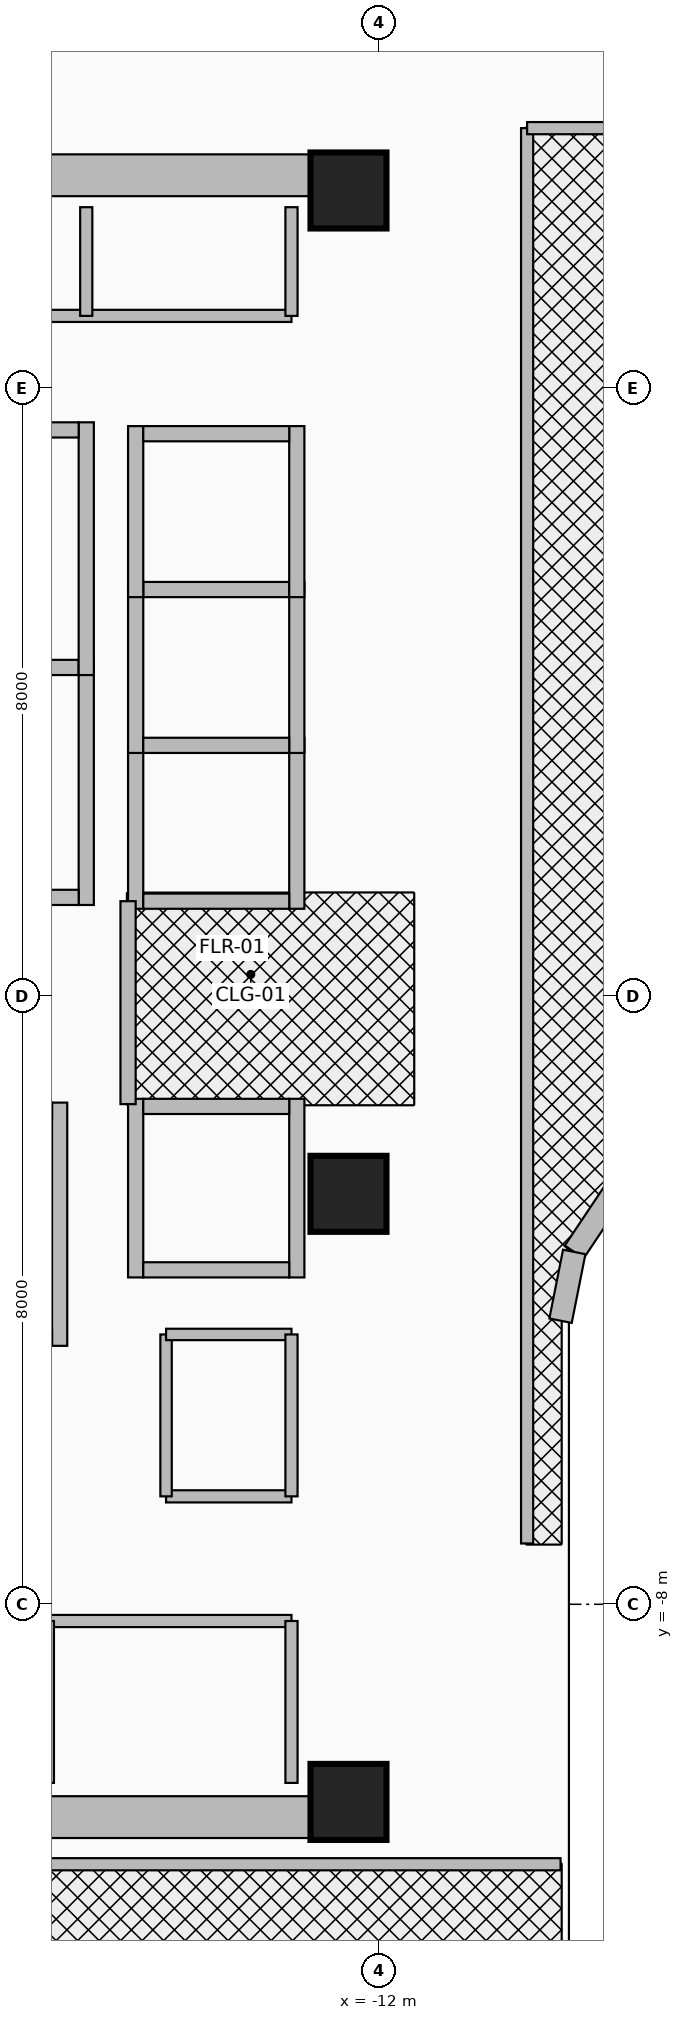
"""IFC4 building model, lengths in metres.
Left out: names, types, materials, properties, quantities, classifications, styles, units other than length and angle.
Written with IfcOpenShell. Run it as: python <this file> out.ifc"""

import sys

from ifc_helpers import new_model, si_unit, direction, frame, frame_2d, origin, origin_2d, place, context, subcontext, project, spatial, rectangle, extrude, source, transform, mapped, element, fill, save


model = new_model("IFC4")
c1 = context("Model", 3, precision=1e-05, world=origin(), true_north=direction((0.0, 1.0)))
c2 = subcontext(c1, "Body", "Model", "MODEL_VIEW")
j1 = project(units=[si_unit("LENGTHUNIT", "METRE"), si_unit("PLANEANGLEUNIT", "RADIAN")], contexts=[c1])
p1 = place(None, origin())
s1 = spatial("IfcSite", under=j1, at=p1, CompositionType="ELEMENT")
p2 = place(p1, origin())
s2 = spatial("IfcBuilding", under=s1, at=p2, CompositionType="ELEMENT")
p3 = place(p2, frame((0.0, 0.0, 180.5)))
s3 = spatial("IfcBuildingStorey", under=s2, at=p3, CompositionType="ELEMENT", Elevation=180.5)
for number, where, z_axis, x_axis in (
    (1, (-22.65, 10.8, 0.0), (0.0, 0.0, 1.0), (1.0, 0.0, 0.0)),
    (2, (-22.65, -10.8, 0.0), (0.0, 0.0, 1.0), (1.0, 0.0, 0.0)),
):
    element("IfcWall", number, at=place(p3, frame(where, z_axis=z_axis, x_axis=x_axis)), inside=s3, PredefinedType="SHEAR", context=c2, shape_type="SweptSolid", body=[
        extrude(rectangle(XDim=10.25, YDim=0.55, at=frame_2d((5.125, 0.0))), origin(), (0.0, 0.0, 1.0), 3.63),
    ])
m1 = source(origin(), c2, "Body", "SweptSolid", [
    extrude(rectangle(XDim=1.0, YDim=1.0, at=origin_2d()), origin(), (0.0, 0.0, 1.0), 3.95),
])
for number, where, z_axis, x_axis in (
    (3, (-12.4, -10.6, 0.0), (0.0, 0.0, 1.0), (1.0, 0.0, 0.0)),
    (4, (-12.4, -2.6, 0.0), (0.0, 0.0, 1.0), (1.0, 0.0, 0.0)),
    (5, (-12.4, 10.6, 0.0), (0.0, 0.0, 1.0), (1.0, 0.0, 0.0)),
):
    element("IfcColumn", number, at=place(p3, frame(where, z_axis=z_axis, x_axis=x_axis)), inside=s3, PredefinedType="COLUMN", context=c2, shape_type="MappedRepresentation", body=[
        mapped(m1, transform((0.0, 0.0, 0.0), x_axis=(1.0, 0.0, 0.0), y_axis=(0.0, 1.0, 0.0), z_axis=(0.0, 0.0, 1.0), scale=1.0)),
    ])
p4 = place(p3, frame((-8.912, -2.588, 0.0), z_axis=(0.0, 0.0, 1.0), x_axis=(-0.555364065883, -0.831607331814, 0.0)))
e6 = element("IfcWall", 6, at=p4, inside=s3, PredefinedType="SOLIDWALL", context=c2, shape_type="SweptSolid", body=[
    extrude(rectangle(XDim=0.933, YDim=0.3, at=frame_2d((0.467, 0.0))), origin(), (0.0, 0.0, 1.0), 3.63),
])
p5 = place(p3, frame((-9.43, -3.365, 0.0), z_axis=(0.0, 0.0, 1.0), x_axis=(-0.195301801101, -0.980743190895, 0.0)))
e7 = element("IfcWall", 7, at=p5, inside=s3, PredefinedType="SOLIDWALL", context=c2, shape_type="SweptSolid", body=[
    extrude(rectangle(XDim=0.923, YDim=0.3, at=frame_2d((0.461, 0.0))), origin(), (0.0, 0.0, 1.0), 3.63),
])
p6 = place(p3, frame((-15.85, 1.2, 0.0), z_axis=(0.0, 0.0, 1.0), x_axis=(0.0, 1.0, 0.0)))
e8 = element("IfcWall", 8, at=p6, inside=s3, PredefinedType="MOVABLE", context=c2, shape_type="SweptSolid", body=[
    extrude(rectangle(XDim=3.225, YDim=0.2, at=frame_2d((1.613, 0.0))), origin(), (0.0, 0.0, 1.0), 3.63),
])
p7 = place(p3, frame((-18.55, 1.3, 0.0), z_axis=(0.0, 0.0, 1.0), x_axis=(1.0, 0.0, 0.0)))
e9 = element("IfcWall", 9, at=p7, inside=s3, PredefinedType="MOVABLE", context=c2, shape_type="SweptSolid", body=[
    extrude(rectangle(XDim=2.6, YDim=0.2, at=frame_2d((1.3, 0.0))), origin(), (0.0, 0.0, 1.0), 3.63),
])
p8 = place(p7, frame((0.7, 0.0, 0.0)))
e10 = element("IfcOpeningElement", 10, at=p8, cuts=e9, PredefinedType="OPENING", context=c2, shape_type="SweptSolid", body=[
    extrude(rectangle(XDim=1.2, YDim=2.1, at=frame_2d((0.6, 1.05))), frame((0.0, 0.115, 0.0), z_axis=(0.0, -1.0, 0.0), x_axis=(1.0, 0.0, 0.0)), (0.0, 0.0, 1.0), 0.23),
])
p9 = place(p3, frame((-18.55, 4.325, 0.0), z_axis=(0.0, 0.0, 1.0), x_axis=(1.0, 0.0, 0.0)))
e11 = element("IfcWall", 11, at=p9, inside=s3, PredefinedType="MOVABLE", context=c2, shape_type="SweptSolid", body=[
    extrude(rectangle(XDim=2.6, YDim=0.2, at=frame_2d((1.3, 0.0))), origin(), (0.0, 0.0, 1.0), 3.63),
])
p10 = place(p3, frame((-16.2, -4.6, 0.0), z_axis=(0.0, 0.0, 1.0), x_axis=(0.0, 1.0, 0.0)))
e12 = element("IfcWall", 12, at=p10, inside=s3, PredefinedType="MOVABLE", context=c2, shape_type="SweptSolid", body=[
    extrude(rectangle(XDim=3.2, YDim=0.2, at=frame_2d((1.6, 0.0))), origin(), (0.0, 0.0, 1.0), 3.63),
])
p11 = place(p3, frame((-15.85, 4.225, 0.0), z_axis=(0.0, 0.0, 1.0), x_axis=(0.0, 1.0, 0.0)))
e13 = element("IfcWall", 13, at=p11, inside=s3, PredefinedType="MOVABLE", context=c2, shape_type="SweptSolid", body=[
    extrude(rectangle(XDim=3.325, YDim=0.2, at=frame_2d((1.663, 0.0))), origin(), (0.0, 0.0, 1.0), 3.63),
])
p12 = place(p3, frame((-18.55, 7.45, 0.0), z_axis=(0.0, 0.0, 1.0), x_axis=(1.0, 0.0, 0.0)))
e14 = element("IfcWall", 14, at=p12, inside=s3, PredefinedType="MOVABLE", context=c2, shape_type="SweptSolid", body=[
    extrude(rectangle(XDim=2.6, YDim=0.2, at=frame_2d((1.3, 0.0))), origin(), (0.0, 0.0, 1.0), 3.63),
])
p13 = place(p12, frame((0.7, 0.0, 0.0)))
e15 = element("IfcOpeningElement", 15, at=p13, cuts=e14, PredefinedType="OPENING", context=c2, shape_type="SweptSolid", body=[
    extrude(rectangle(XDim=1.2, YDim=2.1, at=frame_2d((0.6, 1.05))), frame((0.0, 0.115, 0.0), z_axis=(0.0, -1.0, 0.0), x_axis=(1.0, 0.0, 0.0)), (0.0, 0.0, 1.0), 0.23),
])
p14 = place(p3, frame((-15.2, 1.15, 0.0), z_axis=(0.0, 0.0, 1.0), x_axis=(0.0, 1.0, 0.0)))
e16 = element("IfcWall", 16, at=p14, inside=s3, PredefinedType="MOVABLE", context=c2, shape_type="SweptSolid", body=[
    extrude(rectangle(XDim=2.25, YDim=0.2, at=frame_2d((1.125, 0.0))), origin(), (0.0, 0.0, 1.0), 3.63),
])
p15 = place(p3, frame((-13.08, 1.15, 0.0), z_axis=(0.0, 0.0, 1.0), x_axis=(0.0, 1.0, 0.0)))
e17 = element("IfcWall", 17, at=p15, inside=s3, PredefinedType="MOVABLE", context=c2, shape_type="SweptSolid", body=[
    extrude(rectangle(XDim=2.25, YDim=0.2, at=frame_2d((1.125, 0.0))), origin(), (0.0, 0.0, 1.0), 3.63),
])
p16 = place(p15, frame((0.575, 0.0, 0.0)))
e18 = element("IfcOpeningElement", 18, at=p16, cuts=e17, PredefinedType="OPENING", context=c2, shape_type="SweptSolid", body=[
    extrude(rectangle(XDim=1.1, YDim=2.1, at=frame_2d((0.55, 1.05))), frame((0.0, 0.115, 0.0), z_axis=(0.0, -1.0, 0.0), x_axis=(1.0, 0.0, 0.0)), (0.0, 0.0, 1.0), 0.23),
])
p17 = place(p3, frame((-15.1, 1.25, 0.0), z_axis=(0.0, 0.0, 1.0), x_axis=(1.0, 0.0, 0.0)))
e19 = element("IfcWall", 19, at=p17, inside=s3, PredefinedType="MOVABLE", context=c2, shape_type="SweptSolid", body=[
    extrude(rectangle(XDim=1.92, YDim=0.2, at=frame_2d((0.96, 0.0))), origin(), (0.0, 0.0, 1.0), 3.63),
])
for number, where, z_axis, x_axis in (
    (20, (-15.2, 3.2, 0.0), (0.0, 0.0, 1.0), (0.0, 1.0, 0.0)),
    (21, (-13.08, 3.2, 0.0), (0.0, 0.0, 1.0), (0.0, 1.0, 0.0)),
):
    element("IfcWall", number, at=place(p3, frame(where, z_axis=z_axis, x_axis=x_axis)), inside=s3, PredefinedType="MOVABLE", context=c2, shape_type="SweptSolid", body=[
        extrude(rectangle(XDim=2.25, YDim=0.2, at=frame_2d((1.125, 0.0))), origin(), (0.0, 0.0, 1.0), 3.63),
    ])
for number, where, z_axis, x_axis in (
    (22, (-15.1, 3.3, 0.0), (0.0, 0.0, 1.0), (1.0, 0.0, 0.0)),
    (23, (-15.1, 5.35, 0.0), (0.0, 0.0, 1.0), (1.0, 0.0, 0.0)),
):
    element("IfcWall", number, at=place(p3, frame(where, z_axis=z_axis, x_axis=x_axis)), inside=s3, PredefinedType="MOVABLE", context=c2, shape_type="SweptSolid", body=[
        extrude(rectangle(XDim=1.92, YDim=0.2, at=frame_2d((0.96, 0.0))), origin(), (0.0, 0.0, 1.0), 3.63),
    ])
for number, where, z_axis, x_axis in (
    (24, (-15.2, 5.25, 0.0), (0.0, 0.0, 1.0), (0.0, 1.0, 0.0)),
    (25, (-13.08, 5.25, 0.0), (0.0, 0.0, 1.0), (0.0, 1.0, 0.0)),
):
    element("IfcWall", number, at=place(p3, frame(where, z_axis=z_axis, x_axis=x_axis)), inside=s3, PredefinedType="MOVABLE", context=c2, shape_type="SweptSolid", body=[
        extrude(rectangle(XDim=2.25, YDim=0.2, at=frame_2d((1.125, 0.0))), origin(), (0.0, 0.0, 1.0), 3.63),
    ])
p18 = place(p3, frame((-15.1, 7.4, 0.0), z_axis=(0.0, 0.0, 1.0), x_axis=(1.0, 0.0, 0.0)))
e26 = element("IfcWall", 26, at=p18, inside=s3, PredefinedType="MOVABLE", context=c2, shape_type="SweptSolid", body=[
    extrude(rectangle(XDim=1.92, YDim=0.2, at=frame_2d((0.96, 0.0))), origin(), (0.0, 0.0, 1.0), 3.63),
])
for number, where, z_axis, x_axis in (
    (27, (-15.2, -3.7, 0.0), (0.0, 0.0, 1.0), (0.0, 1.0, 0.0)),
    (28, (-13.08, -3.7, 0.0), (0.0, 0.0, 1.0), (0.0, 1.0, 0.0)),
):
    element("IfcWall", number, at=place(p3, frame(where, z_axis=z_axis, x_axis=x_axis)), inside=s3, PredefinedType="MOVABLE", context=c2, shape_type="SweptSolid", body=[
        extrude(rectangle(XDim=2.35, YDim=0.2, at=frame_2d((1.175, 0.0))), origin(), (0.0, 0.0, 1.0), 3.63),
    ])
for number, where, z_axis, x_axis in (
    (29, (-15.1, -3.6, 0.0), (0.0, 0.0, 1.0), (1.0, 0.0, 0.0)),
    (30, (-15.1, -1.45, 0.0), (0.0, 0.0, 1.0), (1.0, 0.0, 0.0)),
):
    element("IfcWall", number, at=place(p3, frame(where, z_axis=z_axis, x_axis=x_axis)), inside=s3, PredefinedType="MOVABLE", context=c2, shape_type="SweptSolid", body=[
        extrude(rectangle(XDim=1.92, YDim=0.2, at=frame_2d((0.96, 0.0))), origin(), (0.0, 0.0, 1.0), 3.63),
    ])
p19 = place(p3, frame((-15.3, -1.42, 0.0), z_axis=(0.0, 0.0, 1.0), x_axis=(0.0, 1.0, 0.0)))
e31 = element("IfcWall", 31, at=p19, inside=s3, PredefinedType="PARTITIONING", context=c2, shape_type="SweptSolid", body=[
    extrude(rectangle(XDim=2.67, YDim=0.2, at=frame_2d((1.335, 0.0))), origin(), (0.0, 0.0, 1.0), 3.63),
])
p20 = place(p19, frame((0.78, 0.0, 0.0)))
e32 = element("IfcOpeningElement", 32, at=p20, cuts=e31, PredefinedType="OPENING", context=c2, shape_type="SweptSolid", body=[
    extrude(rectangle(XDim=1.05, YDim=2.15, at=frame_2d((0.525, 1.075))), frame((0.0, 0.115, 0.0), z_axis=(0.0, -1.0, 0.0), x_axis=(1.0, 0.0, 0.0)), (0.0, 0.0, 1.0), 0.23),
])
p21 = place(p3, frame((-18.65, 8.95, 0.0), z_axis=(0.0, 0.0, 1.0), x_axis=(1.0, 0.0, 0.0)))
e33 = element("IfcWall", 33, at=p21, inside=s3, PredefinedType="PARTITIONING", context=c2, shape_type="SweptSolid", body=[
    extrude(rectangle(XDim=5.5, YDim=0.16, at=frame_2d((2.75, 0.0))), origin(), (0.0, 0.0, 1.0), 3.63),
])
p22 = place(p21, frame((0.3, 0.0, 0.0)))
e34 = element("IfcOpeningElement", 34, at=p22, cuts=e33, PredefinedType="OPENING", context=c2, shape_type="SweptSolid", body=[
    extrude(rectangle(XDim=0.85, YDim=2.05, at=frame_2d((0.425, 1.025))), frame((0.0, 0.095, 0.0), z_axis=(0.0, -1.0, 0.0), x_axis=(1.0, 0.0, 0.0)), (0.0, 0.0, 1.0), 0.19),
])
p23 = place(p21, frame((3.2, 0.0, 0.0)))
e35 = element("IfcOpeningElement", 35, at=p23, cuts=e33, PredefinedType="OPENING", context=c2, shape_type="SweptSolid", body=[
    extrude(rectangle(XDim=0.85, YDim=2.05, at=frame_2d((0.425, 1.025))), frame((0.0, 0.095, 0.0), z_axis=(0.0, -1.0, 0.0), x_axis=(1.0, 0.0, 0.0)), (0.0, 0.0, 1.0), 0.19),
])
p24 = place(p3, frame((-13.15, 8.95, 0.0), z_axis=(0.0, 0.0, 1.0), x_axis=(0.0, 1.0, 0.0)))
e36 = element("IfcWall", 36, at=p24, inside=s3, PredefinedType="PARTITIONING", context=c2, shape_type="SweptSolid", body=[
    extrude(rectangle(XDim=1.43, YDim=0.16, at=frame_2d((0.715, 0.0))), origin(), (0.0, 0.0, 1.0), 3.63),
])
p25 = place(p3, frame((-15.85, 8.95, 0.0), z_axis=(0.0, 0.0, 1.0), x_axis=(0.0, 1.0, 0.0)))
e37 = element("IfcWall", 37, at=p25, inside=s3, PredefinedType="PARTITIONING", context=c2, shape_type="SweptSolid", body=[
    extrude(rectangle(XDim=1.43, YDim=0.16, at=frame_2d((0.715, 0.0))), origin(), (0.0, 0.0, 1.0), 3.63),
])
p26 = place(p25, frame((0.29, 0.0, 0.0)))
e38 = element("IfcOpeningElement", 38, at=p26, cuts=e37, PredefinedType="OPENING", context=c2, shape_type="SweptSolid", body=[
    extrude(rectangle(XDim=0.85, YDim=2.05, at=frame_2d((0.425, 1.025))), frame((0.0, 0.095, 0.0), z_axis=(0.0, -1.0, 0.0), x_axis=(1.0, 0.0, 0.0)), (0.0, 0.0, 1.0), 0.19),
])
p27 = place(p3, frame((-16.35, -8.22, 0.0), z_axis=(0.0, 0.0, 1.0), x_axis=(1.0, 0.0, 0.0)))
e39 = element("IfcWall", 39, at=p27, inside=s3, PredefinedType="PARTITIONING", context=c2, shape_type="SweptSolid", body=[
    extrude(rectangle(XDim=3.2, YDim=0.16, at=frame_2d((1.6, 0.0))), origin(), (0.0, 0.0, 1.0), 3.63),
])
p28 = place(p27, frame((1.15, 0.0, 0.0)))
e40 = element("IfcOpeningElement", 40, at=p28, cuts=e39, PredefinedType="OPENING", context=c2, shape_type="SweptSolid", body=[
    extrude(rectangle(XDim=0.95, YDim=2.15, at=frame_2d((0.475, 1.075))), frame((0.0, 0.095, 0.0), z_axis=(0.0, -1.0, 0.0), x_axis=(1.0, 0.0, 0.0)), (0.0, 0.0, 1.0), 0.19),
])
p29 = place(p3, frame((-16.35, -10.35, 0.0), z_axis=(0.0, 0.0, 1.0), x_axis=(0.0, 1.0, 0.0)))
e41 = element("IfcWall", 41, at=p29, inside=s3, PredefinedType="PARTITIONING", context=c2, shape_type="SweptSolid", body=[
    extrude(rectangle(XDim=2.13, YDim=0.15, at=frame_2d((1.065, 0.0))), origin(), (0.0, 0.0, 1.0), 3.63),
])
p30 = place(p3, frame((-13.15, -10.35, 0.0), z_axis=(0.0, 0.0, 1.0), x_axis=(0.0, 1.0, 0.0)))
e42 = element("IfcWall", 42, at=p30, inside=s3, PredefinedType="PARTITIONING", context=c2, shape_type="SweptSolid", body=[
    extrude(rectangle(XDim=2.13, YDim=0.16, at=frame_2d((1.065, 0.0))), origin(), (0.0, 0.0, 1.0), 3.63),
])
p31 = place(p3, frame((-14.8, -6.58, 0.0), z_axis=(0.0, 0.0, 1.0), x_axis=(1.0, 0.0, 0.0)))
e43 = element("IfcWall", 43, at=p31, inside=s3, PredefinedType="PARTITIONING", context=c2, shape_type="SweptSolid", body=[
    extrude(rectangle(XDim=1.65, YDim=0.16, at=frame_2d((0.825, 0.0))), origin(), (0.0, 0.0, 1.0), 3.63),
])
p32 = place(p31, frame((0.5, 0.0, 0.0)))
e44 = element("IfcOpeningElement", 44, at=p32, cuts=e43, PredefinedType="OPENING", context=c2, shape_type="SweptSolid", body=[
    extrude(rectangle(XDim=0.85, YDim=2.05, at=frame_2d((0.425, 1.025))), frame((0.0, 0.095, 0.0), z_axis=(0.0, -1.0, 0.0), x_axis=(1.0, 0.0, 0.0)), (0.0, 0.0, 1.0), 0.19),
])
p33 = place(p3, frame((-14.8, -6.58, 0.0), z_axis=(0.0, 0.0, 1.0), x_axis=(0.0, 1.0, 0.0)))
e45 = element("IfcWall", 45, at=p33, inside=s3, PredefinedType="PARTITIONING", context=c2, shape_type="SweptSolid", body=[
    extrude(rectangle(XDim=2.13, YDim=0.15, at=frame_2d((1.065, 0.0))), origin(), (0.0, 0.0, 1.0), 3.63),
])
p34 = place(p3, frame((-14.8, -4.45, 0.0), z_axis=(0.0, 0.0, 1.0), x_axis=(1.0, 0.0, 0.0)))
e46 = element("IfcWall", 46, at=p34, inside=s3, PredefinedType="PARTITIONING", context=c2, shape_type="SweptSolid", body=[
    extrude(rectangle(XDim=1.65, YDim=0.15, at=frame_2d((0.825, 0.0))), origin(), (0.0, 0.0, 1.0), 3.63),
])
p35 = place(p3, frame((-13.15, -6.58, 0.0), z_axis=(0.0, 0.0, 1.0), x_axis=(0.0, 1.0, 0.0)))
e47 = element("IfcWall", 47, at=p35, inside=s3, PredefinedType="PARTITIONING", context=c2, shape_type="SweptSolid", body=[
    extrude(rectangle(XDim=2.13, YDim=0.16, at=frame_2d((1.065, 0.0))), origin(), (0.0, 0.0, 1.0), 3.63),
])
p36 = place(p3, frame((-23.45, -11.42, 0.0), z_axis=(0.0, 0.0, 1.0), x_axis=(1.0, 0.0, 0.0)))
e48 = element("IfcWall", 48, at=p36, inside=s3, PredefinedType="PARTITIONING", context=c2, shape_type="SweptSolid", body=[
    extrude(rectangle(XDim=13.84, YDim=0.16, at=frame_2d((6.92, 0.0))), origin(), (0.0, 0.0, 1.0), 3.004),
])
p37 = place(p3, frame((-10.05, -7.2, 0.0), z_axis=(0.0, 0.0, 1.0), x_axis=(0.0, 1.0, 0.0)))
e49 = element("IfcWall", 49, at=p37, inside=s3, PredefinedType="PARTITIONING", context=c2, shape_type="SweptSolid", body=[
    extrude(rectangle(XDim=18.62, YDim=0.16, at=frame_2d((9.31, 0.0))), origin(), (0.0, 0.0, 1.0), 2.415),
])
p38 = place(p37, frame((12.0, 0.0, 0.0)))
e50 = element("IfcOpeningElement", 50, at=p38, cuts=e49, PredefinedType="OPENING", context=c2, shape_type="SweptSolid", body=[
    extrude(rectangle(XDim=1.8, YDim=2.15, at=frame_2d((0.9, 1.075))), frame((0.0, 0.095, 0.0), z_axis=(0.0, -1.0, 0.0), x_axis=(1.0, 0.0, 0.0)), (0.0, 0.0, 1.0), 0.19),
])
p39 = place(p3, frame((-10.05, 11.42, 0.0), z_axis=(0.0, 0.0, 1.0), x_axis=(1.0, 0.0, 0.0)))
e51 = element("IfcWall", 51, at=p39, inside=s3, PredefinedType="PARTITIONING", context=c2, shape_type="SweptSolid", body=[
    extrude(rectangle(XDim=7.85, YDim=0.16, at=frame_2d((3.925, 0.0))), origin(), (0.0, 0.0, 1.0), 2.615),
])
p40 = place(p16, origin())
e52 = element("IfcDoor", 52, at=p40, inside=s3, OperationType="DOUBLE_DOOR_SLIDING", PredefinedType="DOOR", context=c2, shape_type="SweptSolid", body=[
    extrude(rectangle(XDim=1.1, YDim=2.1, at=frame_2d((0.55, 1.05))), frame((0.0, 0.025, 0.0), z_axis=(0.0, -1.0, 0.0), x_axis=(1.0, 0.0, 0.0)), (0.0, 0.0, 1.0), 0.05),
])
fill(e18, e52)
p41 = place(p20, origin())
e53 = element("IfcDoor", 53, at=p41, inside=s3, OperationType="SINGLE_SWING_RIGHT", PredefinedType="DOOR", context=c2, shape_type="SweptSolid", body=[
    extrude(rectangle(XDim=1.05, YDim=2.15, at=frame_2d((0.525, 1.075))), frame((0.0, 0.025, 0.0), z_axis=(0.0, -1.0, 0.0), x_axis=(1.0, 0.0, 0.0)), (0.0, 0.0, 1.0), 0.05),
])
fill(e32, e53)
p42 = place(p23, origin())
e54 = element("IfcDoor", 54, at=p42, inside=s3, OperationType="SINGLE_SWING_RIGHT", PredefinedType="DOOR", context=c2, shape_type="SweptSolid", body=[
    extrude(rectangle(XDim=0.85, YDim=2.05, at=frame_2d((0.425, 1.025))), frame((0.0, 0.025, 0.0), z_axis=(0.0, -1.0, 0.0), x_axis=(1.0, 0.0, 0.0)), (0.0, 0.0, 1.0), 0.05),
])
fill(e35, e54)
p43 = place(p26, origin())
e55 = element("IfcDoor", 55, at=p43, inside=s3, OperationType="SINGLE_SWING_LEFT", PredefinedType="DOOR", context=c2, shape_type="SweptSolid", body=[
    extrude(rectangle(XDim=0.85, YDim=2.05, at=frame_2d((0.425, 1.025))), frame((0.0, 0.025, 0.0), z_axis=(0.0, -1.0, 0.0), x_axis=(1.0, 0.0, 0.0)), (0.0, 0.0, 1.0), 0.05),
])
fill(e38, e55)
p44 = place(p28, origin())
e56 = element("IfcDoor", 56, at=p44, inside=s3, OperationType="SINGLE_SWING_RIGHT", PredefinedType="DOOR", context=c2, shape_type="SweptSolid", body=[
    extrude(rectangle(XDim=0.95, YDim=2.15, at=frame_2d((0.475, 1.075))), frame((0.0, 0.025, 0.0), z_axis=(0.0, -1.0, 0.0), x_axis=(1.0, 0.0, 0.0)), (0.0, 0.0, 1.0), 0.05),
])
fill(e40, e56)
p45 = place(p32, origin())
e57 = element("IfcDoor", 57, at=p45, inside=s3, OperationType="SINGLE_SWING_LEFT", PredefinedType="DOOR", context=c2, shape_type="SweptSolid", body=[
    extrude(rectangle(XDim=0.85, YDim=2.05, at=frame_2d((0.425, 1.025))), frame((0.0, 0.025, 0.0), z_axis=(0.0, -1.0, 0.0), x_axis=(1.0, 0.0, 0.0)), (0.0, 0.0, 1.0), 0.05),
])
fill(e44, e57)
p46 = place(p38, frame((1.8, 0.0, 0.0), z_axis=(0.0, 0.0, 1.0), x_axis=(-1.0, 0.0, 0.0)))
e58 = element("IfcDoor", 58, at=p46, inside=s3, OperationType="DOUBLE_DOOR_SINGLE_SWING", PredefinedType="DOOR", context=c2, shape_type="SweptSolid", body=[
    extrude(rectangle(XDim=1.8, YDim=2.15, at=frame_2d((0.9, 1.075))), frame((0.0, 0.025, 0.0), z_axis=(0.0, -1.0, 0.0), x_axis=(1.0, 0.0, 0.0)), (0.0, 0.0, 1.0), 0.05),
])
fill(e50, e58)
save(model, sys.argv[1])
